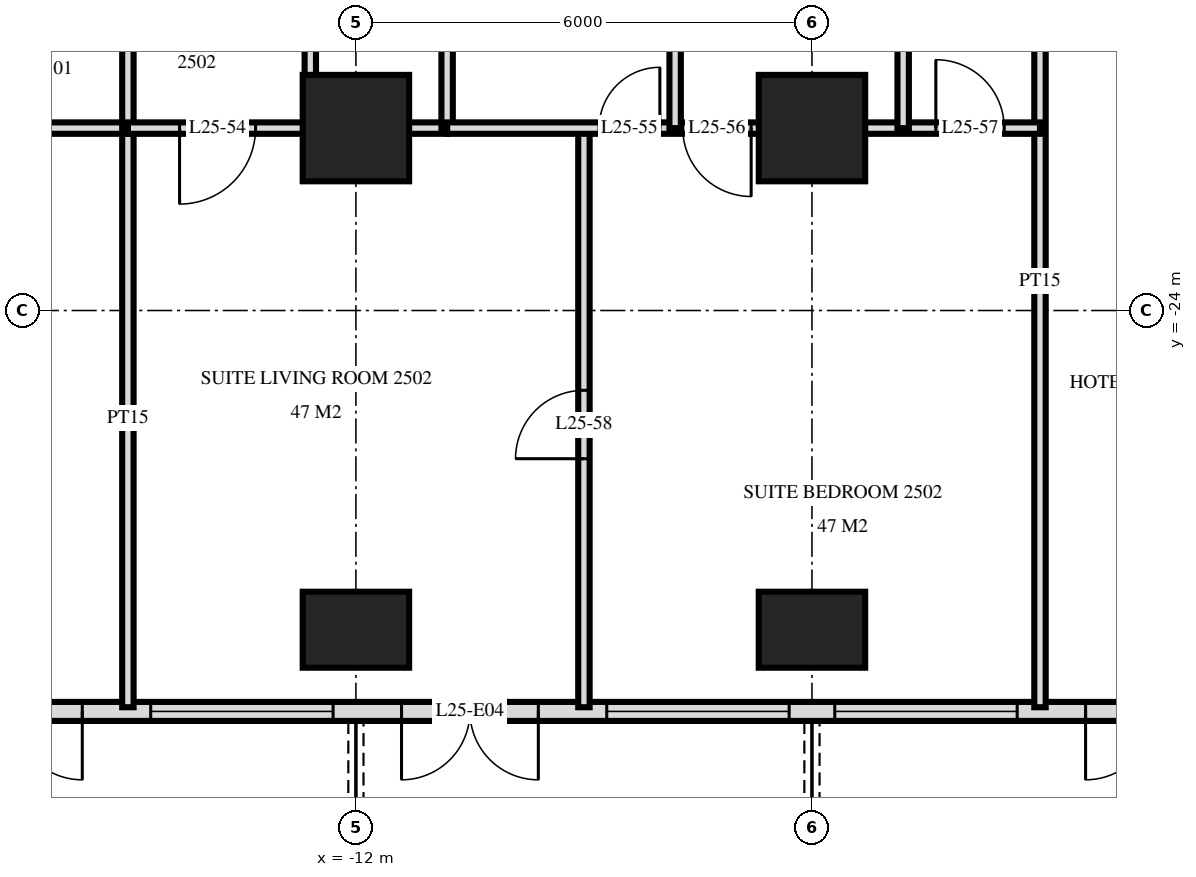
"""IFC4 building model, lengths in metres.
Left out: names, types, materials, properties, quantities, classifications, styles, units other than length and angle.
Written with IfcOpenShell. Run it as: python <this file> out.ifc"""

import sys

from ifc_helpers import new_model, si_unit, direction, frame, frame_2d, origin, origin_2d, place, context, subcontext, project, spatial, rectangle, extrude, element, fill, save


model = new_model("IFC4")
c1 = context("Model", 3, precision=1e-05, world=origin(), true_north=direction((0.0, 1.0)))
c2 = subcontext(c1, "Body", "Model", "MODEL_VIEW")
j1 = project(units=[si_unit("LENGTHUNIT", "METRE"), si_unit("PLANEANGLEUNIT", "RADIAN")], contexts=[c1])
p1 = place(None, origin())
s1 = spatial("IfcSite", under=j1, at=p1, CompositionType="ELEMENT")
p2 = place(p1, origin())
s2 = spatial("IfcBuilding", under=s1, at=p2, CompositionType="ELEMENT")
p3 = place(p2, frame((0.0, 0.0, 99.6)))
s3 = spatial("IfcBuildingStorey", under=s2, at=p3, CompositionType="ELEMENT", Elevation=99.6)
p4 = place(p3, frame((-12.0, -28.2, 0.0), z_axis=(0.0, 0.0, 1.0), x_axis=(1.0, 0.0, 0.0)))
e1 = element("IfcColumn", 1, at=p4, inside=s3, PredefinedType="COLUMN", context=c2, shape_type="SweptSolid", body=[
    extrude(rectangle(XDim=1.4, YDim=1.0, at=origin_2d()), origin(), (0.0, 0.0, 1.0), 3.6),
])
p5 = place(p3, frame((-12.0, -21.6, 0.0), z_axis=(0.0, 0.0, 1.0), x_axis=(1.0, 0.0, 0.0)))
e2 = element("IfcColumn", 2, at=p5, inside=s3, PredefinedType="COLUMN", context=c2, shape_type="SweptSolid", body=[
    extrude(rectangle(XDim=1.4, YDim=1.4, at=origin_2d()), origin(), (0.0, 0.0, 1.0), 3.6),
])
p6 = place(p3, frame((-6.0, -28.2, 0.0), z_axis=(0.0, 0.0, 1.0), x_axis=(1.0, 0.0, 0.0)))
e3 = element("IfcColumn", 3, at=p6, inside=s3, PredefinedType="COLUMN", context=c2, shape_type="SweptSolid", body=[
    extrude(rectangle(XDim=1.4, YDim=1.0, at=origin_2d()), origin(), (0.0, 0.0, 1.0), 3.6),
])
p7 = place(p3, frame((-6.0, -21.6, 0.0), z_axis=(0.0, 0.0, 1.0), x_axis=(1.0, 0.0, 0.0)))
e4 = element("IfcColumn", 4, at=p7, inside=s3, PredefinedType="COLUMN", context=c2, shape_type="SweptSolid", body=[
    extrude(rectangle(XDim=1.4, YDim=1.4, at=origin_2d()), origin(), (0.0, 0.0, 1.0), 3.6),
])
p8 = place(p3, frame((-28.775, -29.275, 0.0), z_axis=(0.0, 0.0, 1.0), x_axis=(1.0, 0.0, 0.0)))
e5 = element("IfcWall", 5, at=p8, inside=s3, PredefinedType="SOLIDWALL", context=c2, shape_type="SweptSolid", body=[
    extrude(rectangle(XDim=57.551, YDim=0.25, at=frame_2d((28.775, 0.0))), origin(), (0.0, 0.0, 1.0), 3.32),
])
p9 = place(p8, frame((0.575, 0.0, 0.0)))
e6 = element("IfcOpeningElement", 6, at=p9, cuts=e5, PredefinedType="OPENING", context=c2, shape_type="SweptSolid", body=[
    extrude(rectangle(XDim=1.8, YDim=2.4, at=frame_2d((0.9, 1.2))), frame((0.0, 0.135, 0.0), z_axis=(0.0, -1.0, 0.0), x_axis=(1.0, 0.0, 0.0)), (0.0, 0.0, 1.0), 0.27),
])
p10 = place(p8, frame((5.375, 0.0, 0.0)))
e7 = element("IfcOpeningElement", 7, at=p10, cuts=e5, PredefinedType="OPENING", context=c2, shape_type="SweptSolid", body=[
    extrude(rectangle(XDim=1.8, YDim=2.4, at=frame_2d((0.9, 1.2))), frame((0.0, 0.135, 0.0), z_axis=(0.0, -1.0, 0.0), x_axis=(1.0, 0.0, 0.0)), (0.0, 0.0, 1.0), 0.27),
])
p11 = place(p8, frame((8.075, 0.0, 0.3)))
e8 = element("IfcOpeningElement", 8, at=p11, cuts=e5, PredefinedType="OPENING", context=c2, shape_type="SweptSolid", body=[
    extrude(rectangle(XDim=2.4, YDim=2.1, at=frame_2d((1.2, 1.05))), frame((0.0, 0.135, 0.0), z_axis=(0.0, -1.0, 0.0), x_axis=(1.0, 0.0, 0.0)), (0.0, 0.0, 1.0), 0.27),
])
p12 = place(p8, frame((11.375, 0.0, 0.0)))
e9 = element("IfcOpeningElement", 9, at=p12, cuts=e5, PredefinedType="OPENING", context=c2, shape_type="SweptSolid", body=[
    extrude(rectangle(XDim=1.8, YDim=2.4, at=frame_2d((0.9, 1.2))), frame((0.0, 0.135, 0.0), z_axis=(0.0, -1.0, 0.0), x_axis=(1.0, 0.0, 0.0)), (0.0, 0.0, 1.0), 0.27),
])
p13 = place(p8, frame((14.075, 0.0, 0.3)))
e10 = element("IfcOpeningElement", 10, at=p13, cuts=e5, PredefinedType="OPENING", context=c2, shape_type="SweptSolid", body=[
    extrude(rectangle(XDim=2.4, YDim=2.1, at=frame_2d((1.2, 1.05))), frame((0.0, 0.135, 0.0), z_axis=(0.0, -1.0, 0.0), x_axis=(1.0, 0.0, 0.0)), (0.0, 0.0, 1.0), 0.27),
])
p14 = place(p8, frame((17.375, 0.0, 0.0)))
e11 = element("IfcOpeningElement", 11, at=p14, cuts=e5, PredefinedType="OPENING", context=c2, shape_type="SweptSolid", body=[
    extrude(rectangle(XDim=1.8, YDim=2.4, at=frame_2d((0.9, 1.2))), frame((0.0, 0.135, 0.0), z_axis=(0.0, -1.0, 0.0), x_axis=(1.0, 0.0, 0.0)), (0.0, 0.0, 1.0), 0.27),
])
p15 = place(p8, frame((20.075, 0.0, 0.3)))
e12 = element("IfcOpeningElement", 12, at=p15, cuts=e5, PredefinedType="OPENING", context=c2, shape_type="SweptSolid", body=[
    extrude(rectangle(XDim=2.4, YDim=2.1, at=frame_2d((1.2, 1.05))), frame((0.0, 0.135, 0.0), z_axis=(0.0, -1.0, 0.0), x_axis=(1.0, 0.0, 0.0)), (0.0, 0.0, 1.0), 0.27),
])
p16 = place(p8, frame((23.075, 0.0, 0.3)))
e13 = element("IfcOpeningElement", 13, at=p16, cuts=e5, PredefinedType="OPENING", context=c2, shape_type="SweptSolid", body=[
    extrude(rectangle(XDim=2.4, YDim=2.1, at=frame_2d((1.2, 1.05))), frame((0.0, 0.135, 0.0), z_axis=(0.0, -1.0, 0.0), x_axis=(1.0, 0.0, 0.0)), (0.0, 0.0, 1.0), 0.27),
])
p17 = place(p8, frame((26.375, 0.0, 0.0)))
e14 = element("IfcOpeningElement", 14, at=p17, cuts=e5, PredefinedType="OPENING", context=c2, shape_type="SweptSolid", body=[
    extrude(rectangle(XDim=1.8, YDim=2.4, at=frame_2d((0.9, 1.2))), frame((0.0, 0.135, 0.0), z_axis=(0.0, -1.0, 0.0), x_axis=(1.0, 0.0, 0.0)), (0.0, 0.0, 1.0), 0.27),
])
p18 = place(p8, frame((29.075, 0.0, 0.3)))
e15 = element("IfcOpeningElement", 15, at=p18, cuts=e5, PredefinedType="OPENING", context=c2, shape_type="SweptSolid", body=[
    extrude(rectangle(XDim=2.4, YDim=2.1, at=frame_2d((1.2, 1.05))), frame((0.0, 0.135, 0.0), z_axis=(0.0, -1.0, 0.0), x_axis=(1.0, 0.0, 0.0)), (0.0, 0.0, 1.0), 0.27),
])
p19 = place(p8, frame((32.375, 0.0, 0.0)))
e16 = element("IfcOpeningElement", 16, at=p19, cuts=e5, PredefinedType="OPENING", context=c2, shape_type="SweptSolid", body=[
    extrude(rectangle(XDim=1.8, YDim=2.4, at=frame_2d((0.9, 1.2))), frame((0.0, 0.135, 0.0), z_axis=(0.0, -1.0, 0.0), x_axis=(1.0, 0.0, 0.0)), (0.0, 0.0, 1.0), 0.27),
])
p20 = place(p8, frame((35.375, 0.0, 0.0)))
e17 = element("IfcOpeningElement", 17, at=p20, cuts=e5, PredefinedType="OPENING", context=c2, shape_type="SweptSolid", body=[
    extrude(rectangle(XDim=1.8, YDim=2.4, at=frame_2d((0.9, 1.2))), frame((0.0, 0.135, 0.0), z_axis=(0.0, -1.0, 0.0), x_axis=(1.0, 0.0, 0.0)), (0.0, 0.0, 1.0), 0.27),
])
p21 = place(p8, frame((38.075, 0.0, 0.3)))
e18 = element("IfcOpeningElement", 18, at=p21, cuts=e5, PredefinedType="OPENING", context=c2, shape_type="SweptSolid", body=[
    extrude(rectangle(XDim=2.4, YDim=2.1, at=frame_2d((1.2, 1.05))), frame((0.0, 0.135, 0.0), z_axis=(0.0, -1.0, 0.0), x_axis=(1.0, 0.0, 0.0)), (0.0, 0.0, 1.0), 0.27),
])
p22 = place(p8, frame((41.375, 0.0, 0.0)))
e19 = element("IfcOpeningElement", 19, at=p22, cuts=e5, PredefinedType="OPENING", context=c2, shape_type="SweptSolid", body=[
    extrude(rectangle(XDim=1.8, YDim=2.4, at=frame_2d((0.9, 1.2))), frame((0.0, 0.135, 0.0), z_axis=(0.0, -1.0, 0.0), x_axis=(1.0, 0.0, 0.0)), (0.0, 0.0, 1.0), 0.27),
])
p23 = place(p8, frame((44.075, 0.0, 0.3)))
e20 = element("IfcOpeningElement", 20, at=p23, cuts=e5, PredefinedType="OPENING", context=c2, shape_type="SweptSolid", body=[
    extrude(rectangle(XDim=2.4, YDim=2.1, at=frame_2d((1.2, 1.05))), frame((0.0, 0.135, 0.0), z_axis=(0.0, -1.0, 0.0), x_axis=(1.0, 0.0, 0.0)), (0.0, 0.0, 1.0), 0.27),
])
p24 = place(p8, frame((47.075, 0.0, 0.3)))
e21 = element("IfcOpeningElement", 21, at=p24, cuts=e5, PredefinedType="OPENING", context=c2, shape_type="SweptSolid", body=[
    extrude(rectangle(XDim=2.4, YDim=2.1, at=frame_2d((1.2, 1.05))), frame((0.0, 0.135, 0.0), z_axis=(0.0, -1.0, 0.0), x_axis=(1.0, 0.0, 0.0)), (0.0, 0.0, 1.0), 0.27),
])
p25 = place(p8, frame((50.375, 0.0, 0.0)))
e22 = element("IfcOpeningElement", 22, at=p25, cuts=e5, PredefinedType="OPENING", context=c2, shape_type="SweptSolid", body=[
    extrude(rectangle(XDim=1.8, YDim=2.4, at=frame_2d((0.9, 1.2))), frame((0.0, 0.135, 0.0), z_axis=(0.0, -1.0, 0.0), x_axis=(1.0, 0.0, 0.0)), (0.0, 0.0, 1.0), 0.27),
])
p26 = place(p8, frame((53.375, 0.0, 0.0)))
e23 = element("IfcOpeningElement", 23, at=p26, cuts=e5, PredefinedType="OPENING", context=c2, shape_type="SweptSolid", body=[
    extrude(rectangle(XDim=1.8, YDim=2.4, at=frame_2d((0.9, 1.2))), frame((0.0, 0.135, 0.0), z_axis=(0.0, -1.0, 0.0), x_axis=(1.0, 0.0, 0.0)), (0.0, 0.0, 1.0), 0.27),
])
p27 = place(p3, frame((-3.0, -29.22, 0.0), z_axis=(0.0, 0.0, 1.0), x_axis=(0.0, 1.0, 0.0)))
e24 = element("IfcWall", 24, at=p27, inside=s3, PredefinedType="PARTITIONING", context=c2, shape_type="SweptSolid", body=[
    extrude(rectangle(XDim=11.22, YDim=0.15, at=frame_2d((5.61, 0.0))), origin(), (0.0, 0.0, 1.0), 3.32),
])
for number, where, z_axis, x_axis in (
    (25, (-4.8, -21.6, 0.0), (0.0, 0.0, 1.0), (0.0, 1.0, 0.0)),
    (26, (-7.8, -21.6, 0.0), (0.0, 0.0, 1.0), (0.0, 1.0, 0.0)),
):
    element("IfcWall", number, at=place(p3, frame(where, z_axis=z_axis, x_axis=x_axis)), inside=s3, PredefinedType="PARTITIONING", context=c2, shape_type="SweptSolid", body=[
        extrude(rectangle(XDim=3.6, YDim=0.15, at=frame_2d((1.8, 0.0))), origin(), (0.0, 0.0, 1.0), 3.32),
    ])
p28 = place(p3, frame((-9.0, -29.22, 0.0), z_axis=(0.0, 0.0, 1.0), x_axis=(0.0, 1.0, 0.0)))
e27 = element("IfcWall", 27, at=p28, inside=s3, PredefinedType="PARTITIONING", context=c2, shape_type="SweptSolid", body=[
    extrude(rectangle(XDim=7.62, YDim=0.15, at=frame_2d((3.81, 0.0))), origin(), (0.0, 0.0, 1.0), 3.32),
])
p29 = place(p28, frame((3.27, 0.0, 0.0)))
e28 = element("IfcOpeningElement", 28, at=p29, cuts=e27, PredefinedType="OPENING", context=c2, shape_type="SweptSolid", body=[
    extrude(rectangle(XDim=0.9, YDim=2.1, at=frame_2d((0.45, 1.05))), frame((0.0, 0.085, 0.0), z_axis=(0.0, -1.0, 0.0), x_axis=(1.0, 0.0, 0.0)), (0.0, 0.0, 1.0), 0.17),
])
p30 = place(p3, frame((-10.8, -21.6, 0.0), z_axis=(0.0, 0.0, 1.0), x_axis=(0.0, 1.0, 0.0)))
e29 = element("IfcWall", 29, at=p30, inside=s3, PredefinedType="PLUMBINGWALL", context=c2, shape_type="SweptSolid", body=[
    extrude(rectangle(XDim=3.6, YDim=0.15, at=frame_2d((1.8, 0.0))), origin(), (0.0, 0.0, 1.0), 3.32),
])
p31 = place(p3, frame((-12.6, -21.6, 0.0), z_axis=(0.0, 0.0, 1.0), x_axis=(0.0, 1.0, 0.0)))
e30 = element("IfcWall", 30, at=p31, inside=s3, PredefinedType="PARTITIONING", context=c2, shape_type="SweptSolid", body=[
    extrude(rectangle(XDim=3.6, YDim=0.15, at=frame_2d((1.8, 0.0))), origin(), (0.0, 0.0, 1.0), 3.32),
])
p32 = place(p31, frame((1.32, 0.0, 0.0)))
e31 = element("IfcOpeningElement", 31, at=p32, cuts=e30, PredefinedType="OPENING", context=c2, shape_type="SweptSolid", body=[
    extrude(rectangle(XDim=1.0, YDim=2.1, at=frame_2d((0.5, 1.05))), frame((0.0, 0.085, 0.0), z_axis=(0.0, -1.0, 0.0), x_axis=(1.0, 0.0, 0.0)), (0.0, 0.0, 1.0), 0.17),
])
p33 = place(p3, frame((-15.0, -21.6, 0.0), z_axis=(0.0, 0.0, 1.0), x_axis=(0.0, 1.0, 0.0)))
e32 = element("IfcWall", 32, at=p33, inside=s3, PredefinedType="PARTITIONING", context=c2, shape_type="SweptSolid", body=[
    extrude(rectangle(XDim=3.6, YDim=0.15, at=frame_2d((1.8, 0.0))), origin(), (0.0, 0.0, 1.0), 3.32),
])
p34 = place(p3, frame((-15.0, -29.22, 0.0), z_axis=(0.0, 0.0, 1.0), x_axis=(0.0, 1.0, 0.0)))
e33 = element("IfcWall", 33, at=p34, inside=s3, PredefinedType="PARTITIONING", context=c2, shape_type="SweptSolid", body=[
    extrude(rectangle(XDim=7.62, YDim=0.15, at=frame_2d((3.81, 0.0))), origin(), (0.0, 0.0, 1.0), 3.32),
])
p35 = place(p3, frame((-15.0, -21.6, 0.0), z_axis=(0.0, 0.0, 1.0), x_axis=(1.0, 0.0, 0.0)))
e34 = element("IfcWall", 34, at=p35, inside=s3, PredefinedType="PARTITIONING", context=c2, shape_type="SweptSolid", body=[
    extrude(rectangle(XDim=2.4, YDim=0.15, at=frame_2d((1.2, 0.0))), origin(), (0.0, 0.0, 1.0), 3.32),
])
p36 = place(p35, frame((0.68, 0.0, 0.0)))
e35 = element("IfcOpeningElement", 35, at=p36, cuts=e34, PredefinedType="OPENING", context=c2, shape_type="SweptSolid", body=[
    extrude(rectangle(XDim=1.0, YDim=2.1, at=frame_2d((0.5, 1.05))), frame((0.0, 0.085, 0.0), z_axis=(0.0, -1.0, 0.0), x_axis=(1.0, 0.0, 0.0)), (0.0, 0.0, 1.0), 0.17),
])
p37 = place(p3, frame((-17.7, -21.6, 0.0), z_axis=(0.0, 0.0, 1.0), x_axis=(1.0, 0.0, 0.0)))
e36 = element("IfcWall", 36, at=p37, inside=s3, PredefinedType="PARTITIONING", context=c2, shape_type="SweptSolid", body=[
    extrude(rectangle(XDim=2.7, YDim=0.15, at=frame_2d((1.35, 0.0))), origin(), (0.0, 0.0, 1.0), 3.32),
])
p38 = place(p3, frame((-10.8, -21.6, 0.0), z_axis=(0.0, 0.0, 1.0), x_axis=(1.0, 0.0, 0.0)))
e37 = element("IfcWall", 37, at=p38, inside=s3, PredefinedType="PARTITIONING", context=c2, shape_type="SweptSolid", body=[
    extrude(rectangle(XDim=7.8, YDim=0.15, at=frame_2d((3.9, 0.0))), origin(), (0.0, 0.0, 1.0), 3.32),
])
p39 = place(p38, frame((1.999, 0.0, 0.0)))
e38 = element("IfcOpeningElement", 38, at=p39, cuts=e37, PredefinedType="OPENING", context=c2, shape_type="SweptSolid", body=[
    extrude(rectangle(XDim=0.8, YDim=2.1, at=frame_2d((0.4, 1.05))), frame((0.0, 0.085, 0.0), z_axis=(0.0, -1.0, 0.0), x_axis=(1.0, 0.0, 0.0)), (0.0, 0.0, 1.0), 0.17),
])
p40 = place(p38, frame((3.1, 0.0, 0.0)))
e39 = element("IfcOpeningElement", 39, at=p40, cuts=e37, PredefinedType="OPENING", context=c2, shape_type="SweptSolid", body=[
    extrude(rectangle(XDim=0.9, YDim=2.1, at=frame_2d((0.45, 1.05))), frame((0.0, 0.085, 0.0), z_axis=(0.0, -1.0, 0.0), x_axis=(1.0, 0.0, 0.0)), (0.0, 0.0, 1.0), 0.17),
])
p41 = place(p38, frame((6.43, 0.0, 0.0)))
e40 = element("IfcOpeningElement", 40, at=p41, cuts=e37, PredefinedType="OPENING", context=c2, shape_type="SweptSolid", body=[
    extrude(rectangle(XDim=0.9, YDim=2.1, at=frame_2d((0.45, 1.05))), frame((0.0, 0.085, 0.0), z_axis=(0.0, -1.0, 0.0), x_axis=(1.0, 0.0, 0.0)), (0.0, 0.0, 1.0), 0.17),
])
p42 = place(p3, frame((-12.6, -21.6, 0.0), z_axis=(0.0, 0.0, 1.0), x_axis=(1.0, 0.0, 0.0)))
e41 = element("IfcWall", 41, at=p42, inside=s3, PredefinedType="PLUMBINGWALL", context=c2, shape_type="SweptSolid", body=[
    extrude(rectangle(XDim=1.8, YDim=0.15, at=frame_2d((0.9, 0.0))), origin(), (0.0, 0.0, 1.0), 3.32),
])
p43 = place(p12, frame((0.9, 0.0, 0.0), z_axis=(0.0, 0.0, 1.0), x_axis=(-1.0, 0.0, 0.0)))
e42 = element("IfcDoor", 42, at=p43, inside=s3, OperationType="DOUBLE_DOOR_SINGLE_SWING", PredefinedType="DOOR", context=c2, shape_type="SweptSolid", body=[
    extrude(rectangle(XDim=1.8, YDim=2.4, at=frame_2d((0.0, 1.2))), frame((0.0, -0.025, 0.0), z_axis=(0.0, 1.0, 0.0), x_axis=(-1.0, 0.0, 0.0)), (0.0, 0.0, 1.0), 0.05),
])
fill(e9, e42)
p44 = place(p13, origin())
e43 = element("IfcWindow", 43, at=p44, inside=s3, PartitioningType="SINGLE_PANEL", PredefinedType="WINDOW", context=c2, shape_type="SweptSolid", body=[
    extrude(rectangle(XDim=2.4, YDim=2.1, at=frame_2d((1.2, 1.05))), frame((0.0, 0.03, 0.0), z_axis=(0.0, -1.0, 0.0), x_axis=(1.0, 0.0, 0.0)), (0.0, 0.0, 1.0), 0.06),
])
fill(e10, e43)
p45 = place(p14, frame((0.9, 0.0, 0.0), z_axis=(0.0, 0.0, 1.0), x_axis=(-1.0, 0.0, 0.0)))
e44 = element("IfcDoor", 44, at=p45, inside=s3, OperationType="DOUBLE_DOOR_SINGLE_SWING", PredefinedType="DOOR", context=c2, shape_type="SweptSolid", body=[
    extrude(rectangle(XDim=1.8, YDim=2.4, at=frame_2d((0.0, 1.2))), frame((0.0, -0.025, 0.0), z_axis=(0.0, 1.0, 0.0), x_axis=(-1.0, 0.0, 0.0)), (0.0, 0.0, 1.0), 0.05),
])
fill(e11, e44)
p46 = place(p15, origin())
e45 = element("IfcWindow", 45, at=p46, inside=s3, PartitioningType="SINGLE_PANEL", PredefinedType="WINDOW", context=c2, shape_type="SweptSolid", body=[
    extrude(rectangle(XDim=2.4, YDim=2.1, at=frame_2d((1.2, 1.05))), frame((0.0, 0.03, 0.0), z_axis=(0.0, -1.0, 0.0), x_axis=(1.0, 0.0, 0.0)), (0.0, 0.0, 1.0), 0.06),
])
fill(e12, e45)
p47 = place(p16, origin())
e46 = element("IfcWindow", 46, at=p47, inside=s3, PartitioningType="SINGLE_PANEL", PredefinedType="WINDOW", context=c2, shape_type="SweptSolid", body=[
    extrude(rectangle(XDim=2.4, YDim=2.1, at=frame_2d((1.2, 1.05))), frame((0.0, 0.03, 0.0), z_axis=(0.0, -1.0, 0.0), x_axis=(1.0, 0.0, 0.0)), (0.0, 0.0, 1.0), 0.06),
])
fill(e13, e46)
p48 = place(p17, frame((0.9, 0.0, 0.0), z_axis=(0.0, 0.0, 1.0), x_axis=(-1.0, 0.0, 0.0)))
e47 = element("IfcDoor", 47, at=p48, inside=s3, OperationType="DOUBLE_DOOR_SINGLE_SWING", PredefinedType="DOOR", context=c2, shape_type="SweptSolid", body=[
    extrude(rectangle(XDim=1.8, YDim=2.4, at=frame_2d((0.0, 1.2))), frame((0.0, -0.025, 0.0), z_axis=(0.0, 1.0, 0.0), x_axis=(-1.0, 0.0, 0.0)), (0.0, 0.0, 1.0), 0.05),
])
fill(e14, e47)
p49 = place(p36, frame((0.5, 0.0, 0.0), z_axis=(0.0, 0.0, 1.0), x_axis=(-1.0, 0.0, 0.0)))
e48 = element("IfcDoor", 48, at=p49, inside=s3, OperationType="SINGLE_SWING_LEFT", PredefinedType="DOOR", context=c2, shape_type="SweptSolid", body=[
    extrude(rectangle(XDim=1.0, YDim=2.1, at=frame_2d((0.0, 1.05))), frame((0.0, -0.025, 0.0), z_axis=(0.0, 1.0, 0.0), x_axis=(-1.0, 0.0, 0.0)), (0.0, 0.0, 1.0), 0.05),
])
fill(e35, e48)
p50 = place(p39, origin())
e49 = element("IfcDoor", 49, at=p50, inside=s3, OperationType="SINGLE_SWING_LEFT", PredefinedType="DOOR", context=c2, shape_type="SweptSolid", body=[
    extrude(rectangle(XDim=0.8, YDim=2.1, at=frame_2d((0.4, 1.05))), frame((0.0, 0.025, 0.0), z_axis=(0.0, -1.0, 0.0), x_axis=(1.0, 0.0, 0.0)), (0.0, 0.0, 1.0), 0.05),
])
fill(e38, e49)
p51 = place(p40, frame((0.45, 0.0, 0.0), z_axis=(0.0, 0.0, 1.0), x_axis=(-1.0, 0.0, 0.0)))
e50 = element("IfcDoor", 50, at=p51, inside=s3, OperationType="SINGLE_SWING_RIGHT", PredefinedType="DOOR", context=c2, shape_type="SweptSolid", body=[
    extrude(rectangle(XDim=0.9, YDim=2.1, at=frame_2d((0.0, 1.05))), frame((0.0, -0.025, 0.0), z_axis=(0.0, 1.0, 0.0), x_axis=(-1.0, 0.0, 0.0)), (0.0, 0.0, 1.0), 0.05),
])
fill(e39, e50)
p52 = place(p41, origin())
e51 = element("IfcDoor", 51, at=p52, inside=s3, OperationType="SINGLE_SWING_RIGHT", PredefinedType="DOOR", context=c2, shape_type="SweptSolid", body=[
    extrude(rectangle(XDim=0.9, YDim=2.1, at=frame_2d((0.45, 1.05))), frame((0.0, 0.025, 0.0), z_axis=(0.0, -1.0, 0.0), x_axis=(1.0, 0.0, 0.0)), (0.0, 0.0, 1.0), 0.05),
])
fill(e40, e51)
p53 = place(p29, origin())
e52 = element("IfcDoor", 52, at=p53, inside=s3, OperationType="SINGLE_SWING_RIGHT", PredefinedType="DOOR", context=c2, shape_type="SweptSolid", body=[
    extrude(rectangle(XDim=0.9, YDim=2.1, at=frame_2d((0.45, 1.05))), frame((0.0, 0.025, 0.0), z_axis=(0.0, -1.0, 0.0), x_axis=(1.0, 0.0, 0.0)), (0.0, 0.0, 1.0), 0.05),
])
fill(e28, e52)
save(model, sys.argv[1])
